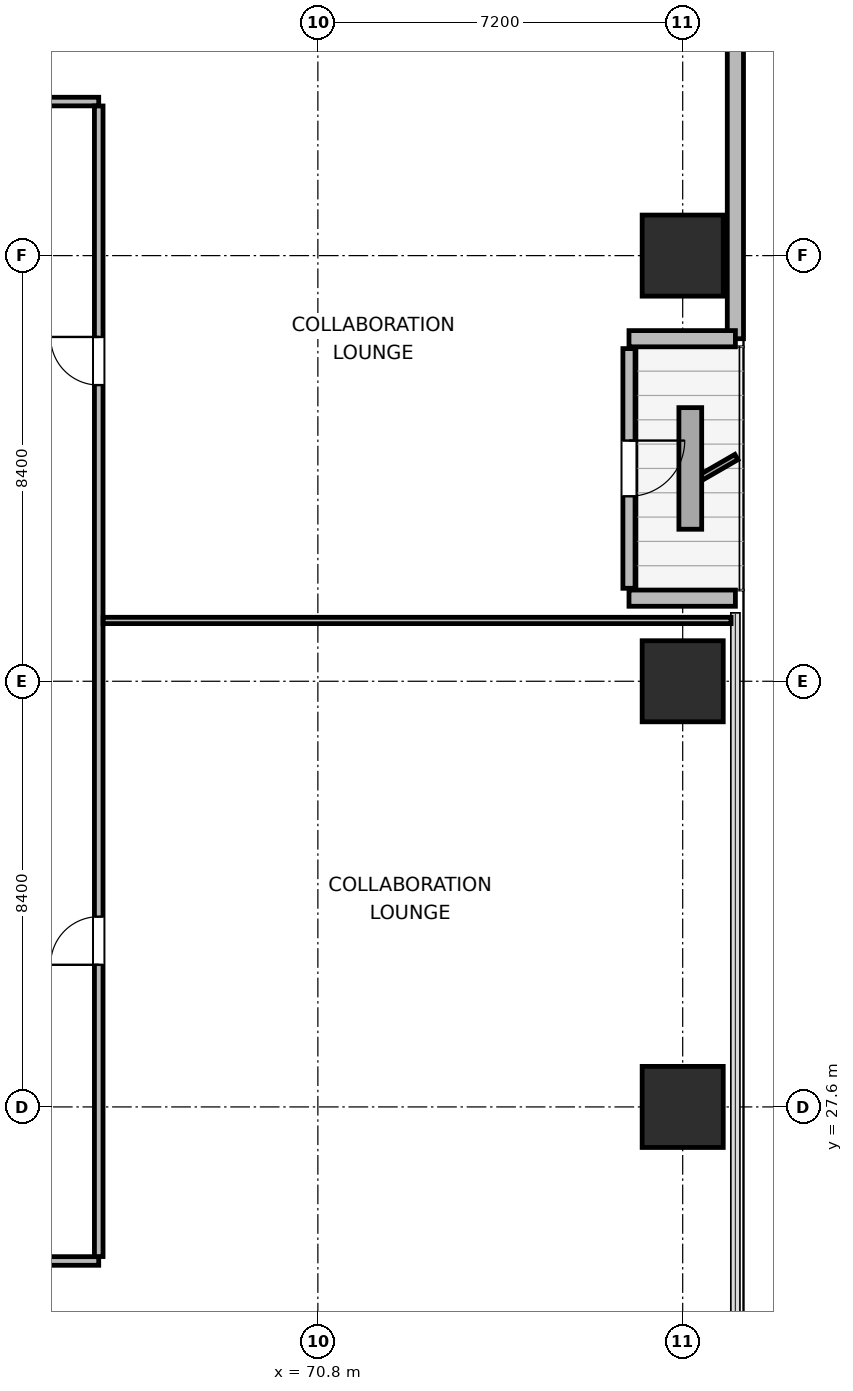
"""IFC4 building model, lengths in metres.
Left out: names, types, materials, properties, quantities, classifications, styles, units other than length and angle.
Written with IfcOpenShell. Run it as: python <this file> out.ifc"""

import sys

from ifc_helpers import new_model, si_unit, direction, frame, frame_2d, origin, origin_2d, place, context, subcontext, project, spatial, rectangle, extrude, element, fill, save


model = new_model("IFC4")
c1 = context("Model", 3, precision=1e-05, world=origin(), true_north=direction((0.0, 1.0)))
c2 = subcontext(c1, "Body", "Model", "MODEL_VIEW")
j1 = project(units=[si_unit("LENGTHUNIT", "METRE"), si_unit("PLANEANGLEUNIT", "RADIAN")], contexts=[c1])
p1 = place(None, origin())
s1 = spatial("IfcSite", under=j1, at=p1, CompositionType="ELEMENT")
p2 = place(p1, origin())
s2 = spatial("IfcBuilding", under=s1, at=p2, CompositionType="ELEMENT")
p3 = place(p2, frame((0.0, 0.0, 56.7)))
s3 = spatial("IfcBuildingStorey", under=s2, at=p3, CompositionType="ELEMENT", Elevation=56.7)
for number, where, z_axis, x_axis in (
    (1, (78.0, 27.6, 0.0), (0.0, 0.0, 1.0), (1.0, 0.0, 0.0)),
    (2, (78.0, 36.0, 0.0), (0.0, 0.0, 1.0), (1.0, 0.0, 0.0)),
    (3, (78.0, 44.4, 0.0), (0.0, 0.0, 1.0), (1.0, 0.0, 0.0)),
):
    element("IfcColumn", number, at=place(p3, frame(where, z_axis=z_axis, x_axis=x_axis)), inside=s3, PredefinedType="COLUMN", context=c2, shape_type="SweptSolid", body=[
        extrude(rectangle(XDim=1.6, YDim=1.6, at=origin_2d()), origin(), (0.0, 0.0, 1.0), 3.9),
    ])
p4 = place(p3, frame((79.04, 56.979, 0.0), z_axis=(0.0, 0.0, 1.0), x_axis=(0.0, -1.0, 0.0)))
e4 = element("IfcWall", 4, at=p4, inside=s3, PredefinedType="SOLIDWALL", context=c2, shape_type="SweptSolid", body=[
    extrude(rectangle(XDim=14.219, YDim=0.32, at=frame_2d((7.109, 0.0))), origin(), (0.0, 0.0, 1.0), 3.64),
])
p5 = place(p3, frame((79.04, 42.76, 0.0), z_axis=(0.0, 0.0, 1.0), x_axis=(-1.0, 0.0, 0.0)))
e5 = element("IfcWall", 5, at=p5, inside=s3, PredefinedType="SOLIDWALL", context=c2, shape_type="SweptSolid", body=[
    extrude(rectangle(XDim=2.1, YDim=0.32, at=frame_2d((1.05, 0.0))), origin(), (0.0, 0.0, 1.0), 2.875),
])
p6 = place(p3, frame((76.94, 42.565, 0.0), z_axis=(0.0, 0.0, 1.0), x_axis=(0.0, -1.0, 0.0)))
e6 = element("IfcWall", 6, at=p6, inside=s3, PredefinedType="SOLIDWALL", context=c2, shape_type="SweptSolid", body=[
    extrude(rectangle(XDim=4.73, YDim=0.24, at=frame_2d((2.365, 0.0))), origin(), (0.0, 0.0, 1.0), 3.162),
])
p7 = place(p6, frame((1.815, 0.0, 0.0)))
e7 = element("IfcOpeningElement", 7, at=p7, cuts=e6, PredefinedType="OPENING", context=c2, shape_type="SweptSolid", body=[
    extrude(rectangle(XDim=1.1, YDim=2.04, at=frame_2d((0.55, 1.02))), frame((0.0, 0.13, 0.0), z_axis=(0.0, -1.0, 0.0), x_axis=(1.0, 0.0, 0.0)), (0.0, 0.0, 1.0), 0.26),
])
p8 = place(p3, frame((76.94, 37.64, 0.0), z_axis=(0.0, 0.0, 1.0), x_axis=(1.0, 0.0, 0.0)))
e8 = element("IfcWall", 8, at=p8, inside=s3, PredefinedType="SOLIDWALL", context=c2, shape_type="SweptSolid", body=[
    extrude(rectangle(XDim=2.1, YDim=0.32, at=frame_2d((1.05, 0.0))), origin(), (0.0, 0.0, 1.0), 2.875),
])
p9 = place(p3, frame((29.525, 24.56, 0.0), z_axis=(0.0, 0.0, 1.0), x_axis=(1.0, 0.0, 0.0)))
e9 = element("IfcWall", 9, at=p9, inside=s3, PredefinedType="PARTITIONING", context=c2, shape_type="SweptSolid", body=[
    extrude(rectangle(XDim=36.95, YDim=0.17, at=frame_2d((18.475, 0.0))), origin(), (0.0, 0.0, 1.0), 3.64),
])
p10 = place(p9, frame((2.283, 0.0, 0.0)))
e10 = element("IfcOpeningElement", 10, at=p10, cuts=e9, PredefinedType="OPENING", context=c2, shape_type="SweptSolid", body=[
    extrude(rectangle(XDim=0.95, YDim=2.04, at=frame_2d((0.475, 1.02))), frame((0.0, 0.095, 0.0), z_axis=(0.0, -1.0, 0.0), x_axis=(1.0, 0.0, 0.0)), (0.0, 0.0, 1.0), 0.19),
])
p11 = place(p9, frame((7.2, 0.0, 0.0)))
e11 = element("IfcOpeningElement", 11, at=p11, cuts=e9, PredefinedType="OPENING", context=c2, shape_type="SweptSolid", body=[
    extrude(rectangle(XDim=0.95, YDim=2.04, at=frame_2d((0.475, 1.02))), frame((0.0, 0.095, 0.0), z_axis=(0.0, -1.0, 0.0), x_axis=(1.0, 0.0, 0.0)), (0.0, 0.0, 1.0), 0.19),
])
p12 = place(p9, frame((11.52, 0.0, 0.0)))
e12 = element("IfcOpeningElement", 12, at=p12, cuts=e9, PredefinedType="OPENING", context=c2, shape_type="SweptSolid", body=[
    extrude(rectangle(XDim=0.95, YDim=2.04, at=frame_2d((0.475, 1.02))), frame((0.0, 0.095, 0.0), z_axis=(0.0, -1.0, 0.0), x_axis=(1.0, 0.0, 0.0)), (0.0, 0.0, 1.0), 0.19),
])
p13 = place(p9, frame((15.84, 0.0, 0.0)))
e13 = element("IfcOpeningElement", 13, at=p13, cuts=e9, PredefinedType="OPENING", context=c2, shape_type="SweptSolid", body=[
    extrude(rectangle(XDim=0.95, YDim=2.04, at=frame_2d((0.475, 1.02))), frame((0.0, 0.095, 0.0), z_axis=(0.0, -1.0, 0.0), x_axis=(1.0, 0.0, 0.0)), (0.0, 0.0, 1.0), 0.19),
])
p14 = place(p9, frame((20.16, 0.0, 0.0)))
e14 = element("IfcOpeningElement", 14, at=p14, cuts=e9, PredefinedType="OPENING", context=c2, shape_type="SweptSolid", body=[
    extrude(rectangle(XDim=0.95, YDim=2.04, at=frame_2d((0.475, 1.02))), frame((0.0, 0.095, 0.0), z_axis=(0.0, -1.0, 0.0), x_axis=(1.0, 0.0, 0.0)), (0.0, 0.0, 1.0), 0.19),
])
p15 = place(p9, frame((24.48, 0.0, 0.0)))
e15 = element("IfcOpeningElement", 15, at=p15, cuts=e9, PredefinedType="OPENING", context=c2, shape_type="SweptSolid", body=[
    extrude(rectangle(XDim=0.95, YDim=2.04, at=frame_2d((0.475, 1.02))), frame((0.0, 0.095, 0.0), z_axis=(0.0, -1.0, 0.0), x_axis=(1.0, 0.0, 0.0)), (0.0, 0.0, 1.0), 0.19),
])
p16 = place(p9, frame((28.8, 0.0, 0.0)))
e16 = element("IfcOpeningElement", 16, at=p16, cuts=e9, PredefinedType="OPENING", context=c2, shape_type="SweptSolid", body=[
    extrude(rectangle(XDim=0.95, YDim=2.04, at=frame_2d((0.475, 1.02))), frame((0.0, 0.095, 0.0), z_axis=(0.0, -1.0, 0.0), x_axis=(1.0, 0.0, 0.0)), (0.0, 0.0, 1.0), 0.19),
])
p17 = place(p9, frame((33.718, 0.0, 0.0)))
e17 = element("IfcOpeningElement", 17, at=p17, cuts=e9, PredefinedType="OPENING", context=c2, shape_type="SweptSolid", body=[
    extrude(rectangle(XDim=0.95, YDim=2.04, at=frame_2d((0.475, 1.02))), frame((0.0, 0.095, 0.0), z_axis=(0.0, -1.0, 0.0), x_axis=(1.0, 0.0, 0.0)), (0.0, 0.0, 1.0), 0.19),
])
p18 = place(p3, frame((29.525, 47.44, 0.0), z_axis=(0.0, 0.0, 1.0), x_axis=(1.0, 0.0, 0.0)))
e18 = element("IfcWall", 18, at=p18, inside=s3, PredefinedType="PARTITIONING", context=c2, shape_type="SweptSolid", body=[
    extrude(rectangle(XDim=36.95, YDim=0.17, at=frame_2d((18.475, 0.0))), origin(), (0.0, 0.0, 1.0), 3.64),
])
p19 = place(p18, frame((4.133, 0.0, 0.0)))
e19 = element("IfcOpeningElement", 19, at=p19, cuts=e18, PredefinedType="OPENING", context=c2, shape_type="SweptSolid", body=[
    extrude(rectangle(XDim=0.95, YDim=2.04, at=frame_2d((0.475, 1.02))), frame((0.0, 0.095, 0.0), z_axis=(0.0, -1.0, 0.0), x_axis=(1.0, 0.0, 0.0)), (0.0, 0.0, 1.0), 0.19),
])
p20 = place(p18, frame((13.645, 0.0, 0.0)))
e20 = element("IfcOpeningElement", 20, at=p20, cuts=e18, PredefinedType="OPENING", context=c2, shape_type="SweptSolid", body=[
    extrude(rectangle(XDim=0.95, YDim=2.04, at=frame_2d((0.475, 1.02))), frame((0.0, 0.095, 0.0), z_axis=(0.0, -1.0, 0.0), x_axis=(1.0, 0.0, 0.0)), (0.0, 0.0, 1.0), 0.19),
])
p21 = place(p18, frame((20.555, 0.0, 0.0)))
e21 = element("IfcOpeningElement", 21, at=p21, cuts=e18, PredefinedType="OPENING", context=c2, shape_type="SweptSolid", body=[
    extrude(rectangle(XDim=0.95, YDim=2.04, at=frame_2d((0.475, 1.02))), frame((0.0, 0.095, 0.0), z_axis=(0.0, -1.0, 0.0), x_axis=(1.0, 0.0, 0.0)), (0.0, 0.0, 1.0), 0.19),
])
p22 = place(p18, frame((29.517, 0.0, 0.0)))
e22 = element("IfcOpeningElement", 22, at=p22, cuts=e18, PredefinedType="OPENING", context=c2, shape_type="SweptSolid", body=[
    extrude(rectangle(XDim=0.95, YDim=2.04, at=frame_2d((0.475, 1.02))), frame((0.0, 0.095, 0.0), z_axis=(0.0, -1.0, 0.0), x_axis=(1.0, 0.0, 0.0)), (0.0, 0.0, 1.0), 0.19),
])
p23 = place(p3, frame((66.475, 24.647, 0.0), z_axis=(0.0, 0.0, 1.0), x_axis=(0.0, 1.0, 0.0)))
e23 = element("IfcWall", 23, at=p23, inside=s3, PredefinedType="PARTITIONING", context=c2, shape_type="SweptSolid", body=[
    extrude(rectangle(XDim=22.706, YDim=0.17, at=frame_2d((11.353, 0.0))), origin(), (0.0, 0.0, 1.0), 3.64),
])
p24 = place(p23, frame((5.758, 0.0, 0.0)))
e24 = element("IfcOpeningElement", 24, at=p24, cuts=e23, PredefinedType="OPENING", context=c2, shape_type="SweptSolid", body=[
    extrude(rectangle(XDim=0.95, YDim=2.04, at=frame_2d((0.475, 1.02))), frame((0.0, 0.095, 0.0), z_axis=(0.0, -1.0, 0.0), x_axis=(1.0, 0.0, 0.0)), (0.0, 0.0, 1.0), 0.19),
])
p25 = place(p23, frame((17.198, 0.0, 0.0)))
e25 = element("IfcOpeningElement", 25, at=p25, cuts=e23, PredefinedType="OPENING", context=c2, shape_type="SweptSolid", body=[
    extrude(rectangle(XDim=0.95, YDim=2.04, at=frame_2d((0.475, 1.02))), frame((0.0, 0.095, 0.0), z_axis=(0.0, -1.0, 0.0), x_axis=(1.0, 0.0, 0.0)), (0.0, 0.0, 1.0), 0.19),
])
p26 = place(p3, frame((66.562, 37.2, 0.0), z_axis=(0.0, 0.0, 1.0), x_axis=(1.0, 0.0, 0.0)))
e26 = element("IfcWall", 26, at=p26, inside=s3, PredefinedType="PARTITIONING", context=c2, shape_type="SweptSolid", body=[
    extrude(rectangle(XDim=12.393, YDim=0.125, at=frame_2d((6.197, 0.0))), origin(), (0.0, 0.0, 1.0), 3.64),
])
p27 = place(p7, origin())
e27 = element("IfcDoor", 27, at=p27, inside=s3, OperationType="SINGLE_SWING_LEFT", PredefinedType="DOOR", context=c2, shape_type="SweptSolid", body=[
    extrude(rectangle(XDim=1.1, YDim=2.04, at=frame_2d((0.55, 1.02))), frame((0.0, 0.025, 0.0), z_axis=(0.0, -1.0, 0.0), x_axis=(1.0, 0.0, 0.0)), (0.0, 0.0, 1.0), 0.05),
])
fill(e7, e27)
p28 = place(p24, origin())
e28 = element("IfcDoor", 28, at=p28, inside=s3, OperationType="SINGLE_SWING_LEFT", PredefinedType="DOOR", context=c2, shape_type="SweptSolid", body=[
    extrude(rectangle(XDim=0.95, YDim=2.04, at=frame_2d((0.475, 1.02))), frame((0.0, 0.025, 0.0), z_axis=(0.0, -1.0, 0.0), x_axis=(1.0, 0.0, 0.0)), (0.0, 0.0, 1.0), 0.05),
])
fill(e24, e28)
p29 = place(p25, origin())
e29 = element("IfcDoor", 29, at=p29, inside=s3, OperationType="SINGLE_SWING_RIGHT", PredefinedType="DOOR", context=c2, shape_type="SweptSolid", body=[
    extrude(rectangle(XDim=0.95, YDim=2.04, at=frame_2d((0.475, 1.02))), frame((0.0, 0.025, 0.0), z_axis=(0.0, -1.0, 0.0), x_axis=(1.0, 0.0, 0.0)), (0.0, 0.0, 1.0), 0.05),
])
fill(e25, e29)
save(model, sys.argv[1])
